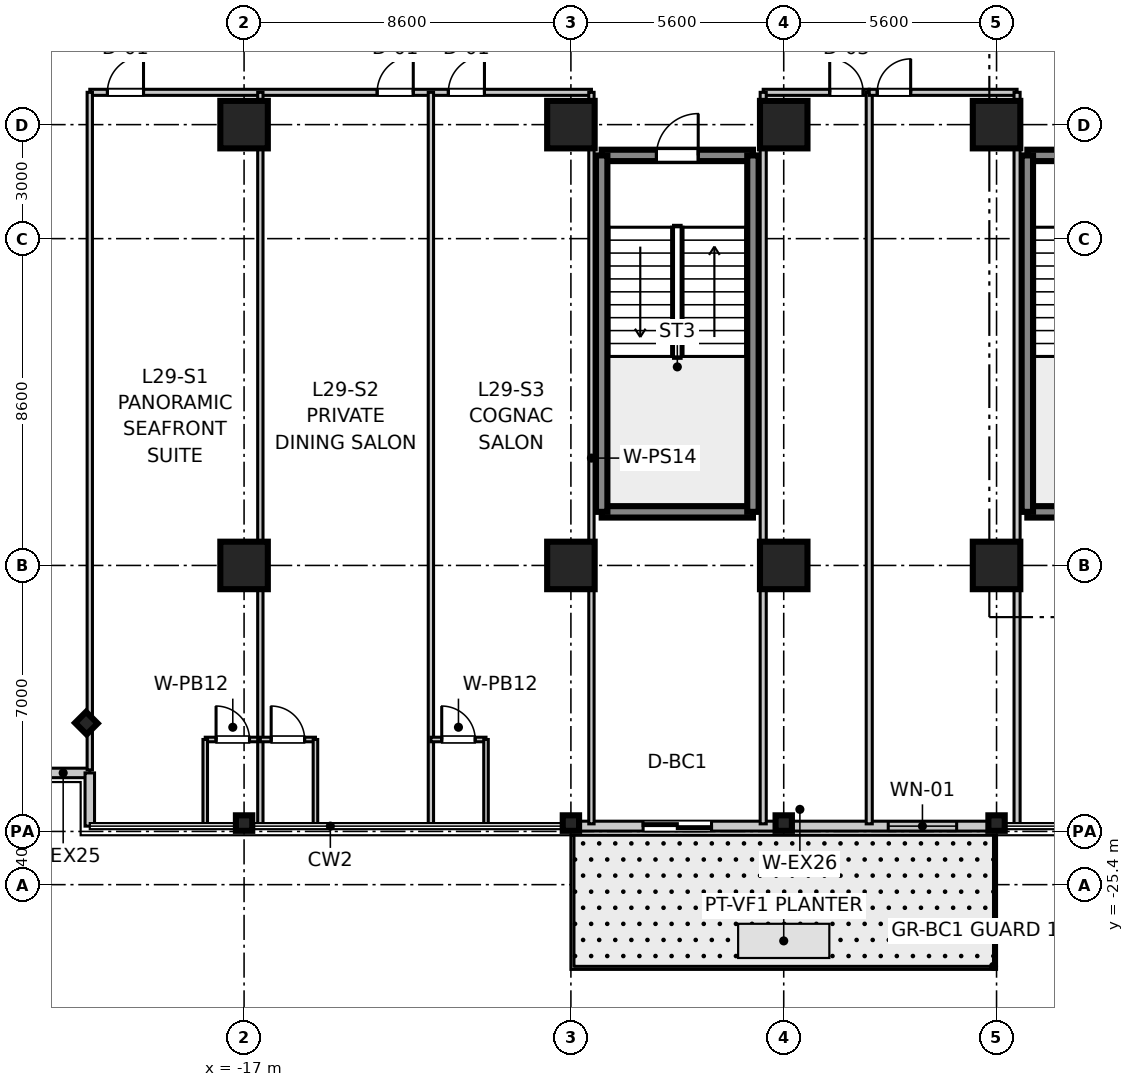
"""IFC4 building model, lengths in metres.
Left out: names, types, materials, properties, quantities, classifications, styles, units other than length and angle.
Written with IfcOpenShell. Run it as: python <this file> out.ifc"""

import sys

from ifc_helpers import new_model, si_unit, direction, frame, frame_2d, origin, origin_2d, place, context, subcontext, project, spatial, rectangle, i_section, extrude, source, transform, mapped, element, fill, save


model = new_model("IFC4")
c1 = context("Model", 3, precision=1e-05, world=origin(), true_north=direction((0.0, 1.0)))
c2 = subcontext(c1, "Body", "Model", "MODEL_VIEW")
j1 = project(units=[si_unit("LENGTHUNIT", "METRE"), si_unit("PLANEANGLEUNIT", "RADIAN")], contexts=[c1])
p1 = place(None, origin())
s1 = spatial("IfcSite", under=j1, at=p1, CompositionType="ELEMENT")
p2 = place(p1, origin())
s2 = spatial("IfcBuilding", under=s1, at=p2, CompositionType="ELEMENT")
p3 = place(p2, frame((0.0, 0.0, 117.5)))
s3 = spatial("IfcBuildingStorey", under=s2, at=p3, CompositionType="ELEMENT", Elevation=117.5)
m1 = source(origin(), c2, "Body", "SweptSolid", [
    extrude(rectangle(XDim=1.25, YDim=1.25, at=origin_2d()), origin(), (0.0, 0.0, 1.0), 3.605),
])
for number, where, z_axis, x_axis in (
    (1, (-17.0, -17.0, 0.0), (0.0, 0.0, 1.0), (1.0, 0.0, 0.0)),
    (2, (-17.0, -5.4, 0.0), (0.0, 0.0, 1.0), (1.0, 0.0, 0.0)),
    (3, (-8.4, -17.0, 0.0), (0.0, 0.0, 1.0), (1.0, 0.0, 0.0)),
    (4, (-8.4, -5.4, 0.0), (0.0, 0.0, 1.0), (1.0, 0.0, 0.0)),
    (5, (-2.8, -17.0, 0.0), (0.0, 0.0, 1.0), (1.0, 0.0, 0.0)),
    (6, (-2.8, -5.4, 0.0), (0.0, 0.0, 1.0), (1.0, 0.0, 0.0)),
    (7, (2.8, -17.0, 0.0), (0.0, 0.0, 1.0), (1.0, 0.0, 0.0)),
    (8, (2.8, -5.4, 0.0), (0.0, 0.0, 1.0), (1.0, 0.0, 0.0)),
):
    element("IfcColumn", number, at=place(p3, frame(where, z_axis=z_axis, x_axis=x_axis)), inside=s3, PredefinedType="COLUMN", context=c2, shape_type="MappedRepresentation", body=[
        mapped(m1, transform((0.0, 0.0, 0.0), scale=1.0)),
    ])
m2 = source(origin(), c2, "Body", "SweptSolid", [
    extrude(i_section(OverallWidth=0.409, OverallDepth=0.43, WebThickness=0.021, FlangeThickness=0.034, at=origin_2d()), origin(), (0.0, 0.0, 1.0), 3.605),
])
for number, where, z_axis, x_axis in (
    (9, (-17.0, -23.78, 0.0), (0.0, 0.0, 1.0), (0.0, 1.0, 0.0)),
    (10, (-8.4, -23.78, 0.0), (0.0, 0.0, 1.0), (0.0, 1.0, 0.0)),
    (11, (-2.8, -23.78, 0.0), (0.0, 0.0, 1.0), (0.0, 1.0, 0.0)),
    (12, (2.8, -23.78, 0.0), (0.0, 0.0, 1.0), (0.0, 1.0, 0.0)),
    (13, (-21.15, -21.15, 0.0), (0.0, 0.0, 1.0), (0.707, 0.707, 0.0)),
):
    element("IfcColumn", number, at=place(p3, frame(where, z_axis=z_axis, x_axis=x_axis)), inside=s3, PredefinedType="COLUMN", context=c2, shape_type="MappedRepresentation", body=[
        mapped(m2, transform((0.0, 0.0, 0.0), scale=1.0)),
    ])
m3 = source(origin(), c2, "Body", "SweptSolid", [
    extrude(rectangle(XDim=3.98, YDim=0.3, at=frame_2d((1.99, 0.0))), origin(), (0.0, 0.0, 1.0), 3.38),
])
for number, where, z_axis, x_axis in (
    (14, (3.61, -15.59, 0.0), (0.0, 0.0, 1.0), (1.0, 0.0, 0.0)),
    (15, (3.61, -6.21, 0.0), (0.0, 0.0, 1.0), (1.0, 0.0, 0.0)),
):
    element("IfcWall", number, at=place(p3, frame(where, z_axis=z_axis, x_axis=x_axis)), inside=s3, PredefinedType="SHEAR", context=c2, shape_type="MappedRepresentation", body=[
        mapped(m3, transform((0.0, 0.0, 0.0), scale=1.0)),
    ])
m4 = source(origin(), c2, "Body", "SweptSolid", [
    extrude(rectangle(XDim=9.38, YDim=0.3, at=frame_2d((4.69, 0.0))), origin(), (0.0, 0.0, 1.0), 3.38),
])
p4 = place(p3, frame((3.61, -15.59, 0.0), z_axis=(0.0, 0.0, 1.0), x_axis=(0.0, 1.0, 0.0)))
e16 = element("IfcWall", 16, at=p4, inside=s3, PredefinedType="SHEAR", context=c2, shape_type="MappedRepresentation", body=[
    mapped(m4, transform((0.0, 0.0, 0.0), scale=1.0)),
])
p5 = place(p3, frame((-7.59, -15.59, 0.0), z_axis=(0.0, 0.0, 1.0), x_axis=(1.0, 0.0, 0.0)))
e17 = element("IfcWall", 17, at=p5, inside=s3, PredefinedType="SHEAR", context=c2, shape_type="MappedRepresentation", body=[
    mapped(m3, transform((0.0, 0.0, 0.0), scale=1.0)),
])
p6 = place(p3, frame((-7.59, -6.21, 0.0), z_axis=(0.0, 0.0, 1.0), x_axis=(1.0, 0.0, 0.0)))
e18 = element("IfcWall", 18, at=p6, inside=s3, PredefinedType="SHEAR", context=c2, shape_type="MappedRepresentation", body=[
    mapped(m3, transform((0.0, 0.0, 0.0), scale=1.0)),
])
p7 = place(p6, frame((1.44, 0.0, 0.0)))
e19 = element("IfcOpeningElement", 19, at=p7, cuts=e18, PredefinedType="OPENING", context=c2, shape_type="SweptSolid", body=[
    extrude(rectangle(XDim=1.1, YDim=2.15, at=frame_2d((0.55, 1.075))), frame((0.0, 0.16, 0.0), z_axis=(0.0, -1.0, 0.0), x_axis=(1.0, 0.0, 0.0)), (0.0, 0.0, 1.0), 0.32),
])
for number, where, z_axis, x_axis in (
    (20, (-7.59, -15.59, 0.0), (0.0, 0.0, 1.0), (0.0, 1.0, 0.0)),
    (21, (-3.61, -15.59, 0.0), (0.0, 0.0, 1.0), (0.0, 1.0, 0.0)),
):
    element("IfcWall", number, at=place(p3, frame(where, z_axis=z_axis, x_axis=x_axis)), inside=s3, PredefinedType="SHEAR", context=c2, shape_type="MappedRepresentation", body=[
        mapped(m4, transform((0.0, 0.0, 0.0), scale=1.0)),
    ])
m5 = source(origin(), c2, "Body", "SweptSolid", [
    extrude(rectangle(XDim=1.4, YDim=0.25, at=frame_2d((0.7, 0.0))), origin(), (0.0, 0.0, 1.0), 3.38),
])
p8 = place(p3, frame((-22.46, -22.46, 0.0), z_axis=(0.0, 0.0, 1.0), x_axis=(1.0, 0.0, 0.0)))
e22 = element("IfcWall", 22, at=p8, inside=s3, PredefinedType="STANDARD", context=c2, shape_type="MappedRepresentation", body=[
    mapped(m5, transform((0.0, 0.0, 0.0), scale=1.0)),
])
m6 = source(origin(), c2, "Body", "SweptSolid", [
    extrude(rectangle(XDim=1.4, YDim=0.25, at=frame_2d((0.7, 0.0))), origin(), (0.0, 0.0, 1.0), 3.38),
])
p9 = place(p3, frame((-21.06, -23.86, 0.0), z_axis=(0.0, 0.0, 1.0), x_axis=(0.0, 1.0, 0.0)))
e23 = element("IfcWall", 23, at=p9, inside=s3, PredefinedType="STANDARD", context=c2, shape_type="MappedRepresentation", body=[
    mapped(m6, transform((0.0, 0.0, 0.0), scale=1.0)),
])
m7 = source(origin(), c2, "Body", "SweptSolid", [
    extrude(rectangle(XDim=11.2, YDim=0.26, at=frame_2d((5.6, 0.0))), origin(), (0.0, 0.0, 1.0), 2.86),
])
p10 = place(p3, frame((-8.4, -23.86, 0.0), z_axis=(0.0, 0.0, 1.0), x_axis=(1.0, 0.0, 0.0)))
e24 = element("IfcWall", 24, at=p10, inside=s3, PredefinedType="STANDARD", context=c2, shape_type="MappedRepresentation", body=[
    mapped(m7, transform((0.0, 0.0, 0.0), scale=1.0)),
])
p11 = place(p10, frame((1.9, 0.0, 0.0)))
e25 = element("IfcOpeningElement", 25, at=p11, cuts=e24, PredefinedType="OPENING", context=c2, shape_type="SweptSolid", body=[
    extrude(rectangle(XDim=1.8, YDim=2.25, at=frame_2d((0.9, 1.125))), frame((0.0, 0.14, 0.0), z_axis=(0.0, -1.0, 0.0), x_axis=(1.0, 0.0, 0.0)), (0.0, 0.0, 1.0), 0.28),
])
p12 = place(p10, frame((8.35, 0.0, 0.85)))
e26 = element("IfcOpeningElement", 26, at=p12, cuts=e24, PredefinedType="OPENING", context=c2, shape_type="SweptSolid", body=[
    extrude(rectangle(XDim=1.8, YDim=1.5, at=frame_2d((0.9, 0.75))), frame((0.0, 0.14, 0.0), z_axis=(0.0, -1.0, 0.0), x_axis=(1.0, 0.0, 0.0)), (0.0, 0.0, 1.0), 0.28),
])
m8 = source(origin(), c2, "Body", "SweptSolid", [
    extrude(rectangle(XDim=13.2, YDim=0.16, at=frame_2d((6.6, 0.0))), origin(), (0.0, 0.0, 1.0), 2.72),
])
p13 = place(p3, frame((-21.06, -4.55, 0.0), z_axis=(0.0, 0.0, 1.0), x_axis=(1.0, 0.0, 0.0)))
e27 = element("IfcWall", 27, at=p13, inside=s3, PredefinedType="PARTITIONING", context=c2, shape_type="MappedRepresentation", body=[
    mapped(m8, transform((0.0, 0.0, 0.0), scale=1.0)),
])
p14 = place(p13, frame((0.464, 0.0, 0.0)))
e28 = element("IfcOpeningElement", 28, at=p14, cuts=e27, PredefinedType="OPENING", context=c2, shape_type="SweptSolid", body=[
    extrude(rectangle(XDim=0.95, YDim=2.1, at=frame_2d((0.475, 1.05))), frame((0.0, 0.09, 0.0), z_axis=(0.0, -1.0, 0.0), x_axis=(1.0, 0.0, 0.0)), (0.0, 0.0, 1.0), 0.18),
])
p15 = place(p13, frame((7.562, 0.0, 0.0)))
e29 = element("IfcOpeningElement", 29, at=p15, cuts=e27, PredefinedType="OPENING", context=c2, shape_type="SweptSolid", body=[
    extrude(rectangle(XDim=0.95, YDim=2.1, at=frame_2d((0.475, 1.05))), frame((0.0, 0.09, 0.0), z_axis=(0.0, -1.0, 0.0), x_axis=(1.0, 0.0, 0.0)), (0.0, 0.0, 1.0), 0.18),
])
p16 = place(p13, frame((9.435, 0.0, 0.0)))
e30 = element("IfcOpeningElement", 30, at=p16, cuts=e27, PredefinedType="OPENING", context=c2, shape_type="SweptSolid", body=[
    extrude(rectangle(XDim=0.95, YDim=2.1, at=frame_2d((0.475, 1.05))), frame((0.0, 0.09, 0.0), z_axis=(0.0, -1.0, 0.0), x_axis=(1.0, 0.0, 0.0)), (0.0, 0.0, 1.0), 0.18),
])
m9 = source(origin(), c2, "Body", "SweptSolid", [
    extrude(rectangle(XDim=17.83, YDim=0.14, at=frame_2d((8.915, 0.0))), origin(), (0.0, 0.0, 1.0), 2.72),
])
p17 = place(p3, frame((-21.06, -22.38, 0.0), z_axis=(0.0, 0.0, 1.0), x_axis=(0.0, 1.0, 0.0)))
e31 = element("IfcWall", 31, at=p17, inside=s3, PredefinedType="PARTITIONING", context=c2, shape_type="MappedRepresentation", body=[
    mapped(m9, transform((0.0, 0.0, 0.0), scale=1.0)),
])
m10 = source(origin(), c2, "Body", "SweptSolid", [
    extrude(rectangle(XDim=19.25, YDim=0.14, at=frame_2d((9.625, 0.0))), origin(), (0.0, 0.0, 1.0), 2.72),
])
p18 = place(p3, frame((-7.86, -23.8, 0.0), z_axis=(0.0, 0.0, 1.0), x_axis=(0.0, 1.0, 0.0)))
e32 = element("IfcWall", 32, at=p18, inside=s3, PredefinedType="PARTITIONING", context=c2, shape_type="MappedRepresentation", body=[
    mapped(m10, transform((0.0, 0.0, 0.0), scale=1.0)),
])
m11 = source(origin(), c2, "Body", "SweptSolid", [
    extrude(rectangle(XDim=1.45, YDim=0.12, at=frame_2d((0.725, 0.0))), origin(), (0.0, 0.0, 1.0), 2.72),
])
p19 = place(p3, frame((-18.022, -21.58, 0.0), z_axis=(0.0, 0.0, 1.0), x_axis=(1.0, 0.0, 0.0)))
e33 = element("IfcWall", 33, at=p19, inside=s3, PredefinedType="PARTITIONING", context=c2, shape_type="MappedRepresentation", body=[
    mapped(m11, transform((0.0, 0.0, 0.0), scale=1.0)),
])
p20 = place(p19, frame((0.285, 0.0, 0.0)))
e34 = element("IfcOpeningElement", 34, at=p20, cuts=e33, PredefinedType="OPENING", context=c2, shape_type="SweptSolid", body=[
    extrude(rectangle(XDim=0.88, YDim=2.1, at=frame_2d((0.44, 1.05))), frame((0.0, 0.07, 0.0), z_axis=(0.0, -1.0, 0.0), x_axis=(1.0, 0.0, 0.0)), (0.0, 0.0, 1.0), 0.14),
])
m12 = source(origin(), c2, "Body", "SweptSolid", [
    extrude(rectangle(XDim=2.22, YDim=0.12, at=frame_2d((1.11, 0.0))), origin(), (0.0, 0.0, 1.0), 2.72),
])
p21 = place(p3, frame((-18.022, -23.8, 0.0), z_axis=(0.0, 0.0, 1.0), x_axis=(0.0, 1.0, 0.0)))
e35 = element("IfcWall", 35, at=p21, inside=s3, PredefinedType="PARTITIONING", context=c2, shape_type="MappedRepresentation", body=[
    mapped(m12, transform((0.0, 0.0, 0.0), scale=1.0)),
])
p22 = place(p3, frame((-16.572, -23.8, 0.0), z_axis=(0.0, 0.0, 1.0), x_axis=(0.0, 1.0, 0.0)))
e36 = element("IfcWall", 36, at=p22, inside=s3, PredefinedType="PARTITIONING", context=c2, shape_type="MappedRepresentation", body=[
    mapped(m10, transform((0.0, 0.0, 0.0), scale=1.0)),
])
p23 = place(p3, frame((-16.572, -21.58, 0.0), z_axis=(0.0, 0.0, 1.0), x_axis=(1.0, 0.0, 0.0)))
e37 = element("IfcWall", 37, at=p23, inside=s3, PredefinedType="PARTITIONING", context=c2, shape_type="MappedRepresentation", body=[
    mapped(m11, transform((0.0, 0.0, 0.0), scale=1.0)),
])
p24 = place(p23, frame((0.285, 0.0, 0.0)))
e38 = element("IfcOpeningElement", 38, at=p24, cuts=e37, PredefinedType="OPENING", context=c2, shape_type="SweptSolid", body=[
    extrude(rectangle(XDim=0.88, YDim=2.1, at=frame_2d((0.44, 1.05))), frame((0.0, 0.07, 0.0), z_axis=(0.0, -1.0, 0.0), x_axis=(1.0, 0.0, 0.0)), (0.0, 0.0, 1.0), 0.14),
])
p25 = place(p3, frame((-15.122, -23.8, 0.0), z_axis=(0.0, 0.0, 1.0), x_axis=(0.0, 1.0, 0.0)))
e39 = element("IfcWall", 39, at=p25, inside=s3, PredefinedType="PARTITIONING", context=c2, shape_type="MappedRepresentation", body=[
    mapped(m12, transform((0.0, 0.0, 0.0), scale=1.0)),
])
p26 = place(p3, frame((-12.084, -23.8, 0.0), z_axis=(0.0, 0.0, 1.0), x_axis=(0.0, 1.0, 0.0)))
e40 = element("IfcWall", 40, at=p26, inside=s3, PredefinedType="PARTITIONING", context=c2, shape_type="MappedRepresentation", body=[
    mapped(m10, transform((0.0, 0.0, 0.0), scale=1.0)),
])
p27 = place(p3, frame((-12.084, -21.58, 0.0), z_axis=(0.0, 0.0, 1.0), x_axis=(1.0, 0.0, 0.0)))
e41 = element("IfcWall", 41, at=p27, inside=s3, PredefinedType="PARTITIONING", context=c2, shape_type="MappedRepresentation", body=[
    mapped(m11, transform((0.0, 0.0, 0.0), scale=1.0)),
])
p28 = place(p27, frame((0.285, 0.0, 0.0)))
e42 = element("IfcOpeningElement", 42, at=p28, cuts=e41, PredefinedType="OPENING", context=c2, shape_type="SweptSolid", body=[
    extrude(rectangle(XDim=0.88, YDim=2.1, at=frame_2d((0.44, 1.05))), frame((0.0, 0.07, 0.0), z_axis=(0.0, -1.0, 0.0), x_axis=(1.0, 0.0, 0.0)), (0.0, 0.0, 1.0), 0.14),
])
p29 = place(p3, frame((-10.634, -23.8, 0.0), z_axis=(0.0, 0.0, 1.0), x_axis=(0.0, 1.0, 0.0)))
e43 = element("IfcWall", 43, at=p29, inside=s3, PredefinedType="PARTITIONING", context=c2, shape_type="MappedRepresentation", body=[
    mapped(m12, transform((0.0, 0.0, 0.0), scale=1.0)),
])
m13 = source(origin(), c2, "Body", "SweptSolid", [
    extrude(rectangle(XDim=2.79, YDim=0.16, at=frame_2d((1.395, 0.0))), origin(), (0.0, 0.0, 1.0), 2.72),
])
p30 = place(p3, frame((-3.34, -4.55, 0.0), z_axis=(0.0, 0.0, 1.0), x_axis=(1.0, 0.0, 0.0)))
e44 = element("IfcWall", 44, at=p30, inside=s3, PredefinedType="PARTITIONING", context=c2, shape_type="MappedRepresentation", body=[
    mapped(m13, transform((0.0, 0.0, 0.0), scale=1.0)),
])
p31 = place(p30, frame((1.75, 0.0, 0.0)))
e45 = element("IfcOpeningElement", 45, at=p31, cuts=e44, PredefinedType="OPENING", context=c2, shape_type="SweptSolid", body=[
    extrude(rectangle(XDim=0.88, YDim=2.1, at=frame_2d((0.44, 1.05))), frame((0.0, 0.09, 0.0), z_axis=(0.0, -1.0, 0.0), x_axis=(1.0, 0.0, 0.0)), (0.0, 0.0, 1.0), 0.18),
])
m14 = source(origin(), c2, "Body", "SweptSolid", [
    extrude(rectangle(XDim=19.25, YDim=0.16, at=frame_2d((9.625, 0.0))), origin(), (0.0, 0.0, 1.0), 2.72),
])
for number, where, z_axis, x_axis in (
    (46, (-3.34, -23.8, 0.0), (0.0, 0.0, 1.0), (0.0, 1.0, 0.0)),
    (47, (-0.55, -23.8, 0.0), (0.0, 0.0, 1.0), (0.0, 1.0, 0.0)),
):
    element("IfcWall", number, at=place(p3, frame(where, z_axis=z_axis, x_axis=x_axis)), inside=s3, PredefinedType="PARTITIONING", context=c2, shape_type="MappedRepresentation", body=[
        mapped(m14, transform((0.0, 0.0, 0.0), scale=1.0)),
    ])
m15 = source(origin(), c2, "Body", "SweptSolid", [
    extrude(rectangle(XDim=3.89, YDim=0.16, at=frame_2d((1.945, 0.0))), origin(), (0.0, 0.0, 1.0), 2.72),
])
p32 = place(p3, frame((-0.55, -4.55, 0.0), z_axis=(0.0, 0.0, 1.0), x_axis=(1.0, 0.0, 0.0)))
e48 = element("IfcWall", 48, at=p32, inside=s3, PredefinedType="PARTITIONING", context=c2, shape_type="MappedRepresentation", body=[
    mapped(m15, transform((0.0, 0.0, 0.0), scale=1.0)),
])
p33 = place(p32, frame((0.21, 0.0, 0.0)))
e49 = element("IfcOpeningElement", 49, at=p33, cuts=e48, PredefinedType="OPENING", context=c2, shape_type="SweptSolid", body=[
    extrude(rectangle(XDim=0.88, YDim=2.1, at=frame_2d((0.44, 1.05))), frame((0.0, 0.09, 0.0), z_axis=(0.0, -1.0, 0.0), x_axis=(1.0, 0.0, 0.0)), (0.0, 0.0, 1.0), 0.18),
])
p34 = place(p3, frame((3.34, -23.8, 0.0), z_axis=(0.0, 0.0, 1.0), x_axis=(0.0, 1.0, 0.0)))
e50 = element("IfcWall", 50, at=p34, inside=s3, PredefinedType="PARTITIONING", context=c2, shape_type="MappedRepresentation", body=[
    mapped(m14, transform((0.0, 0.0, 0.0), scale=1.0)),
])
m16 = source(origin(), c2, "Body", "SweptSolid", [
    extrude(rectangle(XDim=1.1, YDim=2.15, at=frame_2d((0.55, 1.075))), frame((0.0, 0.025, 0.0), z_axis=(0.0, -1.0, 0.0), x_axis=(1.0, 0.0, 0.0)), (0.0, 0.0, 1.0), 0.05),
])
p35 = place(p7, frame((1.1, 0.0, 0.0), z_axis=(0.0, 0.0, 1.0), x_axis=(-1.0, 0.0, 0.0)))
e51 = element("IfcDoor", 51, at=p35, inside=s3, OperationType="SINGLE_SWING_RIGHT", PredefinedType="DOOR", context=c2, shape_type="MappedRepresentation", body=[
    mapped(m16, transform((0.0, 0.0, 0.0), scale=1.0)),
])
fill(e19, e51)
m17 = source(origin(), c2, "Body", "SweptSolid", [
    extrude(rectangle(XDim=0.88, YDim=2.1, at=frame_2d((0.44, 1.05))), frame((0.0, 0.025, 0.0), z_axis=(0.0, -1.0, 0.0), x_axis=(1.0, 0.0, 0.0)), (0.0, 0.0, 1.0), 0.05),
])
p36 = place(p20, frame((0.88, 0.0, 0.0), z_axis=(0.0, 0.0, 1.0), x_axis=(-1.0, 0.0, 0.0)))
e52 = element("IfcDoor", 52, at=p36, inside=s3, OperationType="SINGLE_SWING_LEFT", PredefinedType="DOOR", context=c2, shape_type="MappedRepresentation", body=[
    mapped(m17, transform((0.0, 0.0, 0.0), scale=1.0)),
])
fill(e34, e52)
m18 = source(origin(), c2, "Body", "SweptSolid", [
    extrude(rectangle(XDim=0.95, YDim=2.1, at=frame_2d((0.475, 1.05))), frame((0.0, 0.025, 0.0), z_axis=(0.0, -1.0, 0.0), x_axis=(1.0, 0.0, 0.0)), (0.0, 0.0, 1.0), 0.05),
])
p37 = place(p14, frame((0.95, 0.0, 0.0), z_axis=(0.0, 0.0, 1.0), x_axis=(-1.0, 0.0, 0.0)))
e53 = element("IfcDoor", 53, at=p37, inside=s3, OperationType="SINGLE_SWING_RIGHT", PredefinedType="DOOR", context=c2, shape_type="MappedRepresentation", body=[
    mapped(m18, transform((0.0, 0.0, 0.0), scale=1.0)),
])
fill(e28, e53)
p38 = place(p24, frame((0.88, 0.0, 0.0), z_axis=(0.0, 0.0, 1.0), x_axis=(-1.0, 0.0, 0.0)))
e54 = element("IfcDoor", 54, at=p38, inside=s3, OperationType="SINGLE_SWING_LEFT", PredefinedType="DOOR", context=c2, shape_type="MappedRepresentation", body=[
    mapped(m17, transform((0.0, 0.0, 0.0), scale=1.0)),
])
fill(e38, e54)
p39 = place(p15, frame((0.95, 0.0, 0.0), z_axis=(0.0, 0.0, 1.0), x_axis=(-1.0, 0.0, 0.0)))
e55 = element("IfcDoor", 55, at=p39, inside=s3, OperationType="SINGLE_SWING_RIGHT", PredefinedType="DOOR", context=c2, shape_type="MappedRepresentation", body=[
    mapped(m18, transform((0.0, 0.0, 0.0), scale=1.0)),
])
fill(e29, e55)
p40 = place(p28, frame((0.88, 0.0, 0.0), z_axis=(0.0, 0.0, 1.0), x_axis=(-1.0, 0.0, 0.0)))
e56 = element("IfcDoor", 56, at=p40, inside=s3, OperationType="SINGLE_SWING_LEFT", PredefinedType="DOOR", context=c2, shape_type="MappedRepresentation", body=[
    mapped(m17, transform((0.0, 0.0, 0.0), scale=1.0)),
])
fill(e42, e56)
p41 = place(p16, frame((0.95, 0.0, 0.0), z_axis=(0.0, 0.0, 1.0), x_axis=(-1.0, 0.0, 0.0)))
e57 = element("IfcDoor", 57, at=p41, inside=s3, OperationType="SINGLE_SWING_RIGHT", PredefinedType="DOOR", context=c2, shape_type="MappedRepresentation", body=[
    mapped(m18, transform((0.0, 0.0, 0.0), scale=1.0)),
])
fill(e30, e57)
p42 = place(p31, frame((0.88, 0.0, 0.0), z_axis=(0.0, 0.0, 1.0), x_axis=(-1.0, 0.0, 0.0)))
e58 = element("IfcDoor", 58, at=p42, inside=s3, OperationType="SINGLE_SWING_LEFT", PredefinedType="DOOR", context=c2, shape_type="MappedRepresentation", body=[
    mapped(m17, transform((0.0, 0.0, 0.0), scale=1.0)),
])
fill(e45, e58)
p43 = place(p33, frame((0.88, 0.0, 0.0), z_axis=(0.0, 0.0, 1.0), x_axis=(-1.0, 0.0, 0.0)))
e59 = element("IfcDoor", 59, at=p43, inside=s3, OperationType="SINGLE_SWING_RIGHT", PredefinedType="DOOR", context=c2, shape_type="MappedRepresentation", body=[
    mapped(m17, transform((0.0, 0.0, 0.0), scale=1.0)),
])
fill(e49, e59)
m19 = source(origin(), c2, "Body", "SweptSolid", [
    extrude(rectangle(XDim=1.8, YDim=2.25, at=frame_2d((0.9, 1.125))), frame((0.0, 0.025, 0.0), z_axis=(0.0, -1.0, 0.0), x_axis=(1.0, 0.0, 0.0)), (0.0, 0.0, 1.0), 0.05),
])
p44 = place(p11, frame((1.8, 0.0, 0.0), z_axis=(0.0, 0.0, 1.0), x_axis=(-1.0, 0.0, 0.0)))
e60 = element("IfcDoor", 60, at=p44, inside=s3, OperationType="DOUBLE_DOOR_SLIDING", PredefinedType="DOOR", context=c2, shape_type="MappedRepresentation", body=[
    mapped(m19, transform((0.0, 0.0, 0.0), scale=1.0)),
])
fill(e25, e60)
m20 = source(origin(), c2, "Body", "SweptSolid", [
    extrude(rectangle(XDim=1.8, YDim=1.5, at=frame_2d((0.9, 0.75))), frame((0.0, 0.03, 0.0), z_axis=(0.0, -1.0, 0.0), x_axis=(1.0, 0.0, 0.0)), (0.0, 0.0, 1.0), 0.06),
])
p45 = place(p12, origin())
e61 = element("IfcWindow", 61, at=p45, inside=s3, PartitioningType="SINGLE_PANEL", PredefinedType="WINDOW", context=c2, shape_type="MappedRepresentation", body=[
    mapped(m20, transform((0.0, 0.0, 0.0), scale=1.0)),
])
fill(e26, e61)
save(model, sys.argv[1])
